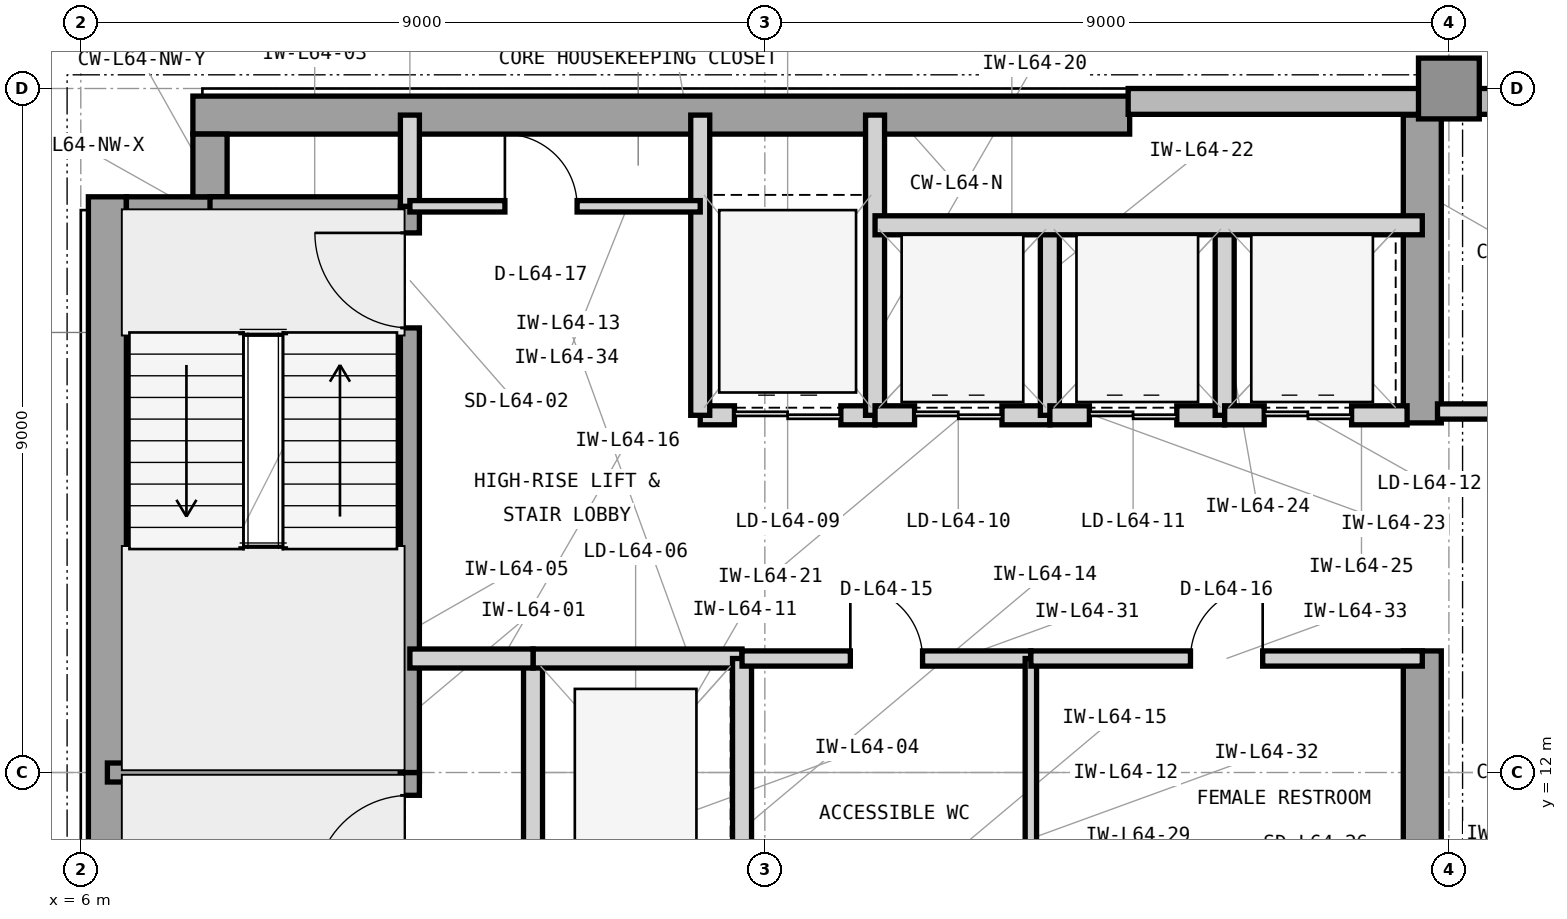
"""IFC4 building model, lengths in metres.
Left out: names, types, materials, properties, quantities, classifications, styles, units other than length and angle.
Written with IfcOpenShell. Run it as: python <this file> out.ifc"""

import sys

from ifc_helpers import new_model, si_unit, direction, frame, frame_2d, origin, origin_2d, place, context, subcontext, project, spatial, rectangle, extrude, element, fill, save


model = new_model("IFC4")
c1 = context("Model", 3, precision=1e-05, world=origin(), true_north=direction((0.0, 1.0)))
c2 = subcontext(c1, "Body", "Model", "MODEL_VIEW")
j1 = project(units=[si_unit("LENGTHUNIT", "METRE"), si_unit("PLANEANGLEUNIT", "RADIAN")], contexts=[c1])
p1 = place(None, origin())
s1 = spatial("IfcSite", under=j1, at=p1, CompositionType="ELEMENT")
p2 = place(p1, origin())
s2 = spatial("IfcBuilding", under=s1, at=p2, CompositionType="ELEMENT")
p3 = place(p2, frame((0.0, 0.0, 262.5)))
s3 = spatial("IfcBuildingStorey", under=s2, at=p3, CompositionType="ELEMENT", Elevation=262.5)
p4 = place(p3, frame((6.35, 4.425, 0.0), z_axis=(0.0, 0.0, 1.0), x_axis=(0.0, 1.0, 0.0)))
e1 = element("IfcWall", 1, at=p4, inside=s3, PredefinedType="SHEAR", context=c2, shape_type="SweptSolid", body=[
    extrude(rectangle(XDim=15.15, YDim=0.5, at=frame_2d((7.575, 0.0))), origin(), (0.0, 0.0, 1.0), 3.9),
])
p5 = place(p3, frame((7.475, 20.65, 0.0), z_axis=(0.0, 0.0, 1.0), x_axis=(1.0, 0.0, 0.0)))
e2 = element("IfcWall", 2, at=p5, inside=s3, PredefinedType="SHEAR", context=c2, shape_type="SweptSolid", body=[
    extrude(rectangle(XDim=12.325, YDim=0.5, at=frame_2d((6.163, 0.0))), origin(), (0.0, 0.0, 1.0), 3.9),
])
p6 = place(p3, frame((23.65, 10.4, 0.0), z_axis=(0.0, 0.0, 1.0), x_axis=(0.0, 1.0, 0.0)))
e3 = element("IfcWall", 3, at=p6, inside=s3, PredefinedType="SHEAR", context=c2, shape_type="SweptSolid", body=[
    extrude(rectangle(XDim=3.2, YDim=0.5, at=frame_2d((1.6, 0.0))), origin(), (0.0, 0.0, 1.0), 3.9),
])
p7 = place(p3, frame((23.65, 16.6, 0.0), z_axis=(0.0, 0.0, 1.0), x_axis=(0.0, 1.0, 0.0)))
e4 = element("IfcWall", 4, at=p7, inside=s3, PredefinedType="SHEAR", context=c2, shape_type="SweptSolid", body=[
    extrude(rectangle(XDim=4.05, YDim=0.5, at=frame_2d((2.025, 0.0))), origin(), (0.0, 0.0, 1.0), 3.9),
])
p8 = place(p3, frame((6.6, 19.35, 0.0), z_axis=(0.0, 0.0, 1.0), x_axis=(1.0, 0.0, 0.0)))
e5 = element("IfcWall", 5, at=p8, inside=s3, PredefinedType="SHEAR", context=c2, shape_type="SweptSolid", body=[
    extrude(rectangle(XDim=1.325, YDim=0.45, at=frame_2d((0.663, 0.0))), origin(), (0.0, 0.0, 1.0), 3.9),
])
p9 = place(p3, frame((7.7, 19.575, 0.0), z_axis=(0.0, 0.0, 1.0), x_axis=(0.0, 1.0, 0.0)))
e6 = element("IfcWall", 6, at=p9, inside=s3, PredefinedType="SHEAR", context=c2, shape_type="SweptSolid", body=[
    extrude(rectangle(XDim=0.825, YDim=0.45, at=frame_2d((0.413, 0.0))), origin(), (0.0, 0.0, 1.0), 3.9),
])
p10 = place(p3, frame((24.0, 21.0, 0.0), z_axis=(0.0, 0.0, 1.0), x_axis=(1.0, 0.0, 0.0)))
e7 = element("IfcColumn", 7, at=p10, inside=s3, PredefinedType="COLUMN", context=c2, shape_type="SweptSolid", body=[
    extrude(rectangle(XDim=0.8, YDim=0.8, at=origin_2d()), origin(), (0.0, 0.0, 1.0), 3.9),
])
p11 = place(p3, frame((52.4, 20.83, 0.0), z_axis=(0.0, 0.0, 1.0), x_axis=(-1.0, 0.0, 0.0)))
e8 = element("IfcWall", 8, at=p11, inside=s3, PredefinedType="STANDARD", context=c2, shape_type="SweptSolid", body=[
    extrude(rectangle(XDim=32.62, YDim=0.34, at=frame_2d((16.31, 0.0))), origin(), (0.0, 0.0, 1.0), 3.715),
])
p12 = place(p11, frame((5.69, 0.0, 0.8)))
e9 = element("IfcOpeningElement", 9, at=p12, cuts=e8, PredefinedType="OPENING", context=c2, shape_type="SweptSolid", body=[
    extrude(rectangle(XDim=2.6, YDim=2.35, at=frame_2d((1.3, 1.175))), frame((0.0, 0.18, 0.0), z_axis=(0.0, -1.0, 0.0), x_axis=(1.0, 0.0, 0.0)), (0.0, 0.0, 1.0), 0.36),
])
p13 = place(p11, frame((15.01, 0.0, 0.8)))
e10 = element("IfcOpeningElement", 10, at=p13, cuts=e8, PredefinedType="OPENING", context=c2, shape_type="SweptSolid", body=[
    extrude(rectangle(XDim=2.6, YDim=2.35, at=frame_2d((1.3, 1.175))), frame((0.0, 0.18, 0.0), z_axis=(0.0, -1.0, 0.0), x_axis=(1.0, 0.0, 0.0)), (0.0, 0.0, 1.0), 0.36),
])
p14 = place(p11, frame((26.226, 0.0, 0.8)))
e11 = element("IfcOpeningElement", 11, at=p14, cuts=e8, PredefinedType="OPENING", context=c2, shape_type="SweptSolid", body=[
    extrude(rectangle(XDim=1.2, YDim=2.35, at=frame_2d((0.6, 1.175))), frame((0.0, 0.18, 0.0), z_axis=(0.0, -1.0, 0.0), x_axis=(1.0, 0.0, 0.0)), (0.0, 0.0, 1.0), 0.36),
])
p15 = place(p11, frame((22.046, 0.0, 0.8)))
e12 = element("IfcOpeningElement", 12, at=p15, cuts=e8, PredefinedType="OPENING", context=c2, shape_type="SweptSolid", body=[
    extrude(rectangle(XDim=2.6, YDim=2.35, at=frame_2d((1.3, 1.175))), frame((0.0, 0.18, 0.0), z_axis=(0.0, -1.0, 0.0), x_axis=(1.0, 0.0, 0.0)), (0.0, 0.0, 1.0), 0.36),
])
p16 = place(p3, frame((6.35, 12.0, 0.0), z_axis=(0.0, 0.0, 1.0), x_axis=(1.0, 0.0, 0.0)))
e13 = element("IfcWall", 13, at=p16, inside=s3, PredefinedType="SHEAR", context=c2, shape_type="SweptSolid", body=[
    extrude(rectangle(XDim=4.105, YDim=0.25, at=frame_2d((2.052, 0.0))), origin(), (0.0, 0.0, 1.0), 3.9),
])
p17 = place(p3, frame((7.7, 19.45, 0.0), z_axis=(0.0, 0.0, 1.0), x_axis=(1.0, 0.0, 0.0)))
e14 = element("IfcWall", 14, at=p17, inside=s3, PredefinedType="SHEAR", context=c2, shape_type="SweptSolid", body=[
    extrude(rectangle(XDim=2.755, YDim=0.25, at=frame_2d((1.377, 0.0))), origin(), (0.0, 0.0, 1.0), 3.9),
])
p18 = place(p3, frame((10.33, 4.55, 0.0), z_axis=(0.0, 0.0, 1.0), x_axis=(0.0, 1.0, 0.0)))
e15 = element("IfcWall", 15, at=p18, inside=s3, PredefinedType="SHEAR", context=c2, shape_type="SweptSolid", body=[
    extrude(rectangle(XDim=7.45, YDim=0.25, at=frame_2d((3.725, 0.0))), origin(), (0.0, 0.0, 1.0), 3.9),
])
p19 = place(p18, frame((5.9, 0.0, 0.0)))
e16 = element("IfcOpeningElement", 16, at=p19, cuts=e15, PredefinedType="OPENING", context=c2, shape_type="SweptSolid", body=[
    extrude(rectangle(XDim=1.25, YDim=2.2, at=frame_2d((0.625, 1.1))), frame((0.0, 0.135, 0.0), z_axis=(0.0, -1.0, 0.0), x_axis=(1.0, 0.0, 0.0)), (0.0, 0.0, 1.0), 0.27),
])
p20 = place(p3, frame((10.33, 12.0, 0.0), z_axis=(0.0, 0.0, 1.0), x_axis=(0.0, 1.0, 0.0)))
e17 = element("IfcWall", 17, at=p20, inside=s3, PredefinedType="SHEAR", context=c2, shape_type="SweptSolid", body=[
    extrude(rectangle(XDim=7.45, YDim=0.25, at=frame_2d((3.725, 0.0))), origin(), (0.0, 0.0, 1.0), 3.9),
])
p21 = place(p20, frame((5.85, 0.0, 0.0)))
e18 = element("IfcOpeningElement", 18, at=p21, cuts=e17, PredefinedType="OPENING", context=c2, shape_type="SweptSolid", body=[
    extrude(rectangle(XDim=1.25, YDim=2.2, at=frame_2d((0.625, 1.1))), frame((0.0, 0.135, 0.0), z_axis=(0.0, -1.0, 0.0), x_axis=(1.0, 0.0, 0.0)), (0.0, 0.0, 1.0), 0.27),
])
p22 = place(p3, frame((10.33, 19.45, 0.0), z_axis=(0.0, 0.0, 1.0), x_axis=(0.0, 1.0, 0.0)))
e19 = element("IfcWall", 19, at=p22, inside=s3, PredefinedType="PARTITIONING", context=c2, shape_type="SweptSolid", body=[
    extrude(rectangle(XDim=1.2, YDim=0.25, at=frame_2d((0.6, 0.0))), origin(), (0.0, 0.0, 1.0), 3.705),
])
p23 = place(p3, frame((11.95, 10.5, 0.0), z_axis=(0.0, 0.0, 1.0), x_axis=(0.0, 1.0, 0.0)))
e20 = element("IfcWall", 20, at=p23, inside=s3, PredefinedType="PARTITIONING", context=c2, shape_type="SweptSolid", body=[
    extrude(rectangle(XDim=3.0, YDim=0.25, at=frame_2d((1.5, 0.0))), origin(), (0.0, 0.0, 1.0), 3.705),
])
p24 = place(p3, frame((11.95, 13.5, 0.0), z_axis=(0.0, 0.0, 1.0), x_axis=(1.0, 0.0, 0.0)))
e21 = element("IfcWall", 21, at=p24, inside=s3, PredefinedType="PARTITIONING", context=c2, shape_type="SweptSolid", body=[
    extrude(rectangle(XDim=2.75, YDim=0.25, at=frame_2d((1.375, 0.0))), origin(), (0.0, 0.0, 1.0), 3.088),
])
p25 = place(p3, frame((14.7, 10.5, 0.0), z_axis=(0.0, 0.0, 1.0), x_axis=(0.0, 1.0, 0.0)))
e22 = element("IfcWall", 22, at=p25, inside=s3, PredefinedType="PARTITIONING", context=c2, shape_type="SweptSolid", body=[
    extrude(rectangle(XDim=3.0, YDim=0.25, at=frame_2d((1.5, 0.0))), origin(), (0.0, 0.0, 1.0), 3.705),
])
p26 = place(p3, frame((10.33, 13.5, 0.0), z_axis=(0.0, 0.0, 1.0), x_axis=(1.0, 0.0, 0.0)))
e23 = element("IfcWall", 23, at=p26, inside=s3, PredefinedType="PARTITIONING", context=c2, shape_type="SweptSolid", body=[
    extrude(rectangle(XDim=1.62, YDim=0.25, at=frame_2d((0.81, 0.0))), origin(), (0.0, 0.0, 1.0), 3.088),
])
p27 = place(p3, frame((14.15, 16.7, 0.0), z_axis=(0.0, 0.0, 1.0), x_axis=(1.0, 0.0, 0.0)))
e24 = element("IfcWall", 24, at=p27, inside=s3, PredefinedType="PARTITIONING", context=c2, shape_type="SweptSolid", body=[
    extrude(rectangle(XDim=2.3, YDim=0.25, at=frame_2d((1.15, 0.0))), origin(), (0.0, 0.0, 1.0), 3.088),
])
p28 = place(p27, frame((0.45, 0.0, 0.0)))
e25 = element("IfcOpeningElement", 25, at=p28, cuts=e24, PredefinedType="OPENING", context=c2, shape_type="SweptSolid", body=[
    extrude(rectangle(XDim=1.4, YDim=2.35, at=frame_2d((0.7, 1.175))), frame((0.0, 0.135, 0.0), z_axis=(0.0, -1.0, 0.0), x_axis=(1.0, 0.0, 0.0)), (0.0, 0.0, 1.0), 0.27),
])
for number, where, z_axis, x_axis in (
    (26, (14.15, 16.7, 0.0), (0.0, 0.0, 1.0), (0.0, 1.0, 0.0)),
    (27, (16.45, 16.7, 0.0), (0.0, 0.0, 1.0), (0.0, 1.0, 0.0)),
):
    element("IfcWall", number, at=place(p3, frame(where, z_axis=z_axis, x_axis=x_axis)), inside=s3, PredefinedType="PARTITIONING", context=c2, shape_type="SweptSolid", body=[
        extrude(rectangle(XDim=3.95, YDim=0.25, at=frame_2d((1.975, 0.0))), origin(), (0.0, 0.0, 1.0), 3.705),
    ])
p29 = place(p3, frame((16.45, 16.7, 0.0), z_axis=(0.0, 0.0, 1.0), x_axis=(1.0, 0.0, 0.0)))
e28 = element("IfcWall", 28, at=p29, inside=s3, PredefinedType="PARTITIONING", context=c2, shape_type="SweptSolid", body=[
    extrude(rectangle(XDim=2.3, YDim=0.25, at=frame_2d((1.15, 0.0))), origin(), (0.0, 0.0, 1.0), 3.088),
])
p30 = place(p29, frame((0.52, 0.0, 0.0)))
e29 = element("IfcOpeningElement", 29, at=p30, cuts=e28, PredefinedType="OPENING", context=c2, shape_type="SweptSolid", body=[
    extrude(rectangle(XDim=1.15, YDim=2.25, at=frame_2d((0.575, 1.125))), frame((0.0, 0.135, 0.0), z_axis=(0.0, -1.0, 0.0), x_axis=(1.0, 0.0, 0.0)), (0.0, 0.0, 1.0), 0.27),
])
p31 = place(p3, frame((18.75, 16.7, 0.0), z_axis=(0.0, 0.0, 1.0), x_axis=(0.0, 1.0, 0.0)))
e30 = element("IfcWall", 30, at=p31, inside=s3, PredefinedType="PARTITIONING", context=c2, shape_type="SweptSolid", body=[
    extrude(rectangle(XDim=2.5, YDim=0.25, at=frame_2d((1.25, 0.0))), origin(), (0.0, 0.0, 1.0), 3.705),
])
p32 = place(p3, frame((18.75, 16.7, 0.0), z_axis=(0.0, 0.0, 1.0), x_axis=(1.0, 0.0, 0.0)))
e31 = element("IfcWall", 31, at=p32, inside=s3, PredefinedType="PARTITIONING", context=c2, shape_type="SweptSolid", body=[
    extrude(rectangle(XDim=2.3, YDim=0.25, at=frame_2d((1.15, 0.0))), origin(), (0.0, 0.0, 1.0), 3.088),
])
p33 = place(p32, frame((0.52, 0.0, 0.0)))
e32 = element("IfcOpeningElement", 32, at=p33, cuts=e31, PredefinedType="OPENING", context=c2, shape_type="SweptSolid", body=[
    extrude(rectangle(XDim=1.15, YDim=2.25, at=frame_2d((0.575, 1.125))), frame((0.0, 0.135, 0.0), z_axis=(0.0, -1.0, 0.0), x_axis=(1.0, 0.0, 0.0)), (0.0, 0.0, 1.0), 0.27),
])
p34 = place(p3, frame((21.05, 16.7, 0.0), z_axis=(0.0, 0.0, 1.0), x_axis=(0.0, 1.0, 0.0)))
e33 = element("IfcWall", 33, at=p34, inside=s3, PredefinedType="PARTITIONING", context=c2, shape_type="SweptSolid", body=[
    extrude(rectangle(XDim=2.5, YDim=0.25, at=frame_2d((1.25, 0.0))), origin(), (0.0, 0.0, 1.0), 3.705),
])
p35 = place(p3, frame((21.05, 16.7, 0.0), z_axis=(0.0, 0.0, 1.0), x_axis=(1.0, 0.0, 0.0)))
e34 = element("IfcWall", 34, at=p35, inside=s3, PredefinedType="PARTITIONING", context=c2, shape_type="SweptSolid", body=[
    extrude(rectangle(XDim=2.4, YDim=0.25, at=frame_2d((1.2, 0.0))), origin(), (0.0, 0.0, 1.0), 3.088),
])
p36 = place(p35, frame((0.52, 0.0, 0.0)))
e35 = element("IfcOpeningElement", 35, at=p36, cuts=e34, PredefinedType="OPENING", context=c2, shape_type="SweptSolid", body=[
    extrude(rectangle(XDim=1.15, YDim=2.25, at=frame_2d((0.575, 1.125))), frame((0.0, 0.135, 0.0), z_axis=(0.0, -1.0, 0.0), x_axis=(1.0, 0.0, 0.0)), (0.0, 0.0, 1.0), 0.27),
])
p37 = place(p3, frame((16.45, 19.2, 0.0), z_axis=(0.0, 0.0, 1.0), x_axis=(1.0, 0.0, 0.0)))
e36 = element("IfcWall", 36, at=p37, inside=s3, PredefinedType="PARTITIONING", context=c2, shape_type="SweptSolid", body=[
    extrude(rectangle(XDim=7.2, YDim=0.25, at=frame_2d((3.6, 0.0))), origin(), (0.0, 0.0, 1.0), 3.705),
])
p38 = place(p3, frame((14.7, 13.5, 0.0), z_axis=(0.0, 0.0, 1.0), x_axis=(1.0, 0.0, 0.0)))
e37 = element("IfcWall", 37, at=p38, inside=s3, PredefinedType="PARTITIONING", context=c2, shape_type="SweptSolid", body=[
    extrude(rectangle(XDim=3.8, YDim=0.2, at=frame_2d((1.9, 0.0))), origin(), (0.0, 0.0, 1.0), 3.088),
])
p39 = place(p38, frame((1.425, 0.0, 0.0)))
e38 = element("IfcOpeningElement", 38, at=p39, cuts=e37, PredefinedType="OPENING", context=c2, shape_type="SweptSolid", body=[
    extrude(rectangle(XDim=0.95, YDim=2.1, at=frame_2d((0.475, 1.05))), frame((0.0, 0.11, 0.0), z_axis=(0.0, -1.0, 0.0), x_axis=(1.0, 0.0, 0.0)), (0.0, 0.0, 1.0), 0.22),
])
p40 = place(p3, frame((18.5, 10.34, 0.0), z_axis=(0.0, 0.0, 1.0), x_axis=(0.0, 1.0, 0.0)))
e39 = element("IfcWall", 39, at=p40, inside=s3, PredefinedType="PARTITIONING", context=c2, shape_type="SweptSolid", body=[
    extrude(rectangle(XDim=3.16, YDim=0.15, at=frame_2d((1.58, 0.0))), origin(), (0.0, 0.0, 1.0), 3.705),
])
p41 = place(p3, frame((18.5, 13.5, 0.0), z_axis=(0.0, 0.0, 1.0), x_axis=(1.0, 0.0, 0.0)))
e40 = element("IfcWall", 40, at=p41, inside=s3, PredefinedType="PARTITIONING", context=c2, shape_type="SweptSolid", body=[
    extrude(rectangle(XDim=5.15, YDim=0.2, at=frame_2d((2.575, 0.0))), origin(), (0.0, 0.0, 1.0), 3.088),
])
p42 = place(p41, frame((2.1, 0.0, 0.0)))
e41 = element("IfcOpeningElement", 41, at=p42, cuts=e40, PredefinedType="OPENING", context=c2, shape_type="SweptSolid", body=[
    extrude(rectangle(XDim=0.95, YDim=2.1, at=frame_2d((0.475, 1.05))), frame((0.0, 0.11, 0.0), z_axis=(0.0, -1.0, 0.0), x_axis=(1.0, 0.0, 0.0)), (0.0, 0.0, 1.0), 0.22),
])
p43 = place(p3, frame((10.33, 19.45, 0.0), z_axis=(0.0, 0.0, 1.0), x_axis=(1.0, 0.0, 0.0)))
e42 = element("IfcWall", 42, at=p43, inside=s3, PredefinedType="PARTITIONING", context=c2, shape_type="SweptSolid", body=[
    extrude(rectangle(XDim=3.82, YDim=0.15, at=frame_2d((1.91, 0.0))), origin(), (0.0, 0.0, 1.0), 3.705),
])
p44 = place(p43, frame((1.25, 0.0, 0.0)))
e43 = element("IfcOpeningElement", 43, at=p44, cuts=e42, PredefinedType="OPENING", context=c2, shape_type="SweptSolid", body=[
    extrude(rectangle(XDim=0.95, YDim=2.1, at=frame_2d((0.475, 1.05))), frame((0.0, 0.085, 0.0), z_axis=(0.0, -1.0, 0.0), x_axis=(1.0, 0.0, 0.0)), (0.0, 0.0, 1.0), 0.17),
])
p45 = place(p3, frame((23.85, 16.75, 0.0), z_axis=(0.0, 0.0, 1.0), x_axis=(1.0, 0.0, 0.0)))
e44 = element("IfcWall", 44, at=p45, inside=s3, PredefinedType="PARTITIONING", context=c2, shape_type="SweptSolid", body=[
    extrude(rectangle(XDim=3.05, YDim=0.2, at=frame_2d((1.525, 0.0))), origin(), (0.0, 0.0, 1.0), 3.705),
])
p46 = place(p45, frame((0.9, 0.0, 0.0)))
e45 = element("IfcOpeningElement", 45, at=p46, cuts=e44, PredefinedType="OPENING", context=c2, shape_type="SweptSolid", body=[
    extrude(rectangle(XDim=1.0, YDim=2.15, at=frame_2d((0.5, 1.075))), frame((0.0, 0.11, 0.0), z_axis=(0.0, -1.0, 0.0), x_axis=(1.0, 0.0, 0.0)), (0.0, 0.0, 1.0), 0.22),
])
p47 = place(p19, origin())
e46 = element("IfcDoor", 46, at=p47, inside=s3, OperationType="SINGLE_SWING_LEFT", PredefinedType="DOOR", context=c2, shape_type="SweptSolid", body=[
    extrude(rectangle(XDim=1.25, YDim=2.2, at=frame_2d((0.625, 1.1))), frame((0.0, 0.025, 0.0), z_axis=(0.0, -1.0, 0.0), x_axis=(1.0, 0.0, 0.0)), (0.0, 0.0, 1.0), 0.05),
])
fill(e16, e46)
p48 = place(p21, origin())
e47 = element("IfcDoor", 47, at=p48, inside=s3, OperationType="SINGLE_SWING_RIGHT", PredefinedType="DOOR", context=c2, shape_type="SweptSolid", body=[
    extrude(rectangle(XDim=1.25, YDim=2.2, at=frame_2d((0.625, 1.1))), frame((0.0, 0.025, 0.0), z_axis=(0.0, -1.0, 0.0), x_axis=(1.0, 0.0, 0.0)), (0.0, 0.0, 1.0), 0.05),
])
fill(e18, e47)
p49 = place(p28, origin())
e48 = element("IfcDoor", 48, at=p49, inside=s3, OperationType="DOUBLE_DOOR_SLIDING", PredefinedType="DOOR", context=c2, shape_type="SweptSolid", body=[
    extrude(rectangle(XDim=1.4, YDim=2.35, at=frame_2d((0.7, 1.175))), frame((0.0, 0.025, 0.0), z_axis=(0.0, -1.0, 0.0), x_axis=(1.0, 0.0, 0.0)), (0.0, 0.0, 1.0), 0.05),
])
fill(e25, e48)
p50 = place(p30, origin())
e49 = element("IfcDoor", 49, at=p50, inside=s3, OperationType="DOUBLE_DOOR_SLIDING", PredefinedType="DOOR", context=c2, shape_type="SweptSolid", body=[
    extrude(rectangle(XDim=1.15, YDim=2.25, at=frame_2d((0.575, 1.125))), frame((0.0, 0.025, 0.0), z_axis=(0.0, -1.0, 0.0), x_axis=(1.0, 0.0, 0.0)), (0.0, 0.0, 1.0), 0.05),
])
fill(e29, e49)
p51 = place(p33, origin())
e50 = element("IfcDoor", 50, at=p51, inside=s3, OperationType="DOUBLE_DOOR_SLIDING", PredefinedType="DOOR", context=c2, shape_type="SweptSolid", body=[
    extrude(rectangle(XDim=1.15, YDim=2.25, at=frame_2d((0.575, 1.125))), frame((0.0, 0.025, 0.0), z_axis=(0.0, -1.0, 0.0), x_axis=(1.0, 0.0, 0.0)), (0.0, 0.0, 1.0), 0.05),
])
fill(e32, e50)
p52 = place(p36, origin())
e51 = element("IfcDoor", 51, at=p52, inside=s3, OperationType="DOUBLE_DOOR_SLIDING", PredefinedType="DOOR", context=c2, shape_type="SweptSolid", body=[
    extrude(rectangle(XDim=1.15, YDim=2.25, at=frame_2d((0.575, 1.125))), frame((0.0, 0.025, 0.0), z_axis=(0.0, -1.0, 0.0), x_axis=(1.0, 0.0, 0.0)), (0.0, 0.0, 1.0), 0.05),
])
fill(e35, e51)
p53 = place(p39, origin())
e52 = element("IfcDoor", 52, at=p53, inside=s3, OperationType="SINGLE_SWING_LEFT", PredefinedType="DOOR", context=c2, shape_type="SweptSolid", body=[
    extrude(rectangle(XDim=0.95, YDim=2.1, at=frame_2d((0.475, 1.05))), frame((0.0, 0.025, 0.0), z_axis=(0.0, -1.0, 0.0), x_axis=(1.0, 0.0, 0.0)), (0.0, 0.0, 1.0), 0.05),
])
fill(e38, e52)
p54 = place(p42, origin())
e53 = element("IfcDoor", 53, at=p54, inside=s3, OperationType="SINGLE_SWING_RIGHT", PredefinedType="DOOR", context=c2, shape_type="SweptSolid", body=[
    extrude(rectangle(XDim=0.95, YDim=2.1, at=frame_2d((0.475, 1.05))), frame((0.0, 0.025, 0.0), z_axis=(0.0, -1.0, 0.0), x_axis=(1.0, 0.0, 0.0)), (0.0, 0.0, 1.0), 0.05),
])
fill(e41, e53)
p55 = place(p44, origin())
e54 = element("IfcDoor", 54, at=p55, inside=s3, OperationType="SINGLE_SWING_LEFT", PredefinedType="DOOR", context=c2, shape_type="SweptSolid", body=[
    extrude(rectangle(XDim=0.95, YDim=2.1, at=frame_2d((0.475, 1.05))), frame((0.0, 0.025, 0.0), z_axis=(0.0, -1.0, 0.0), x_axis=(1.0, 0.0, 0.0)), (0.0, 0.0, 1.0), 0.05),
])
fill(e43, e54)
save(model, sys.argv[1])
